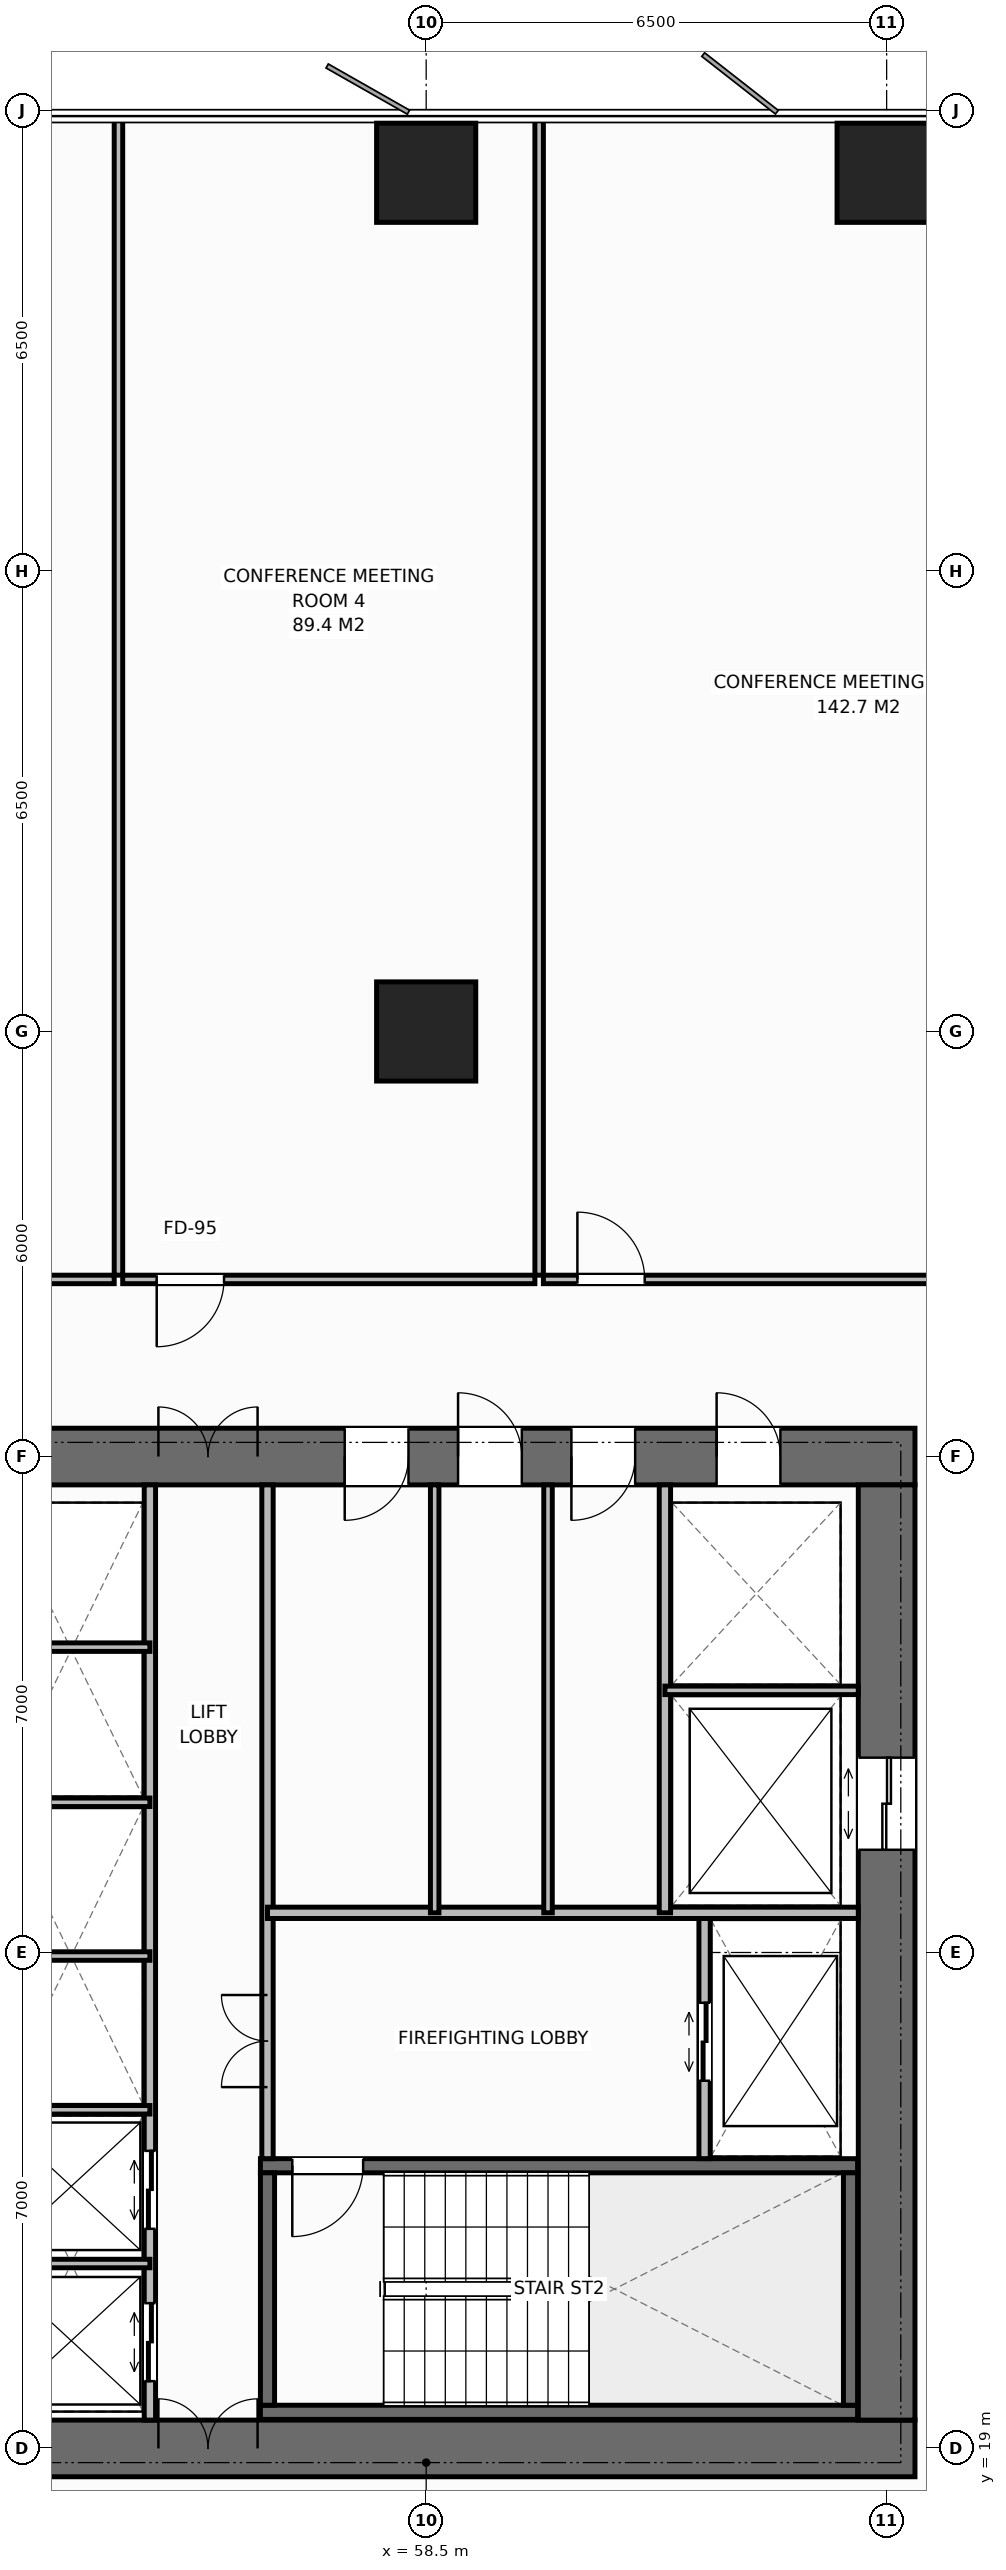
"""IFC4 building model, lengths in metres.
Left out: names, types, materials, properties, quantities, classifications, styles, units other than length and angle.
Written with IfcOpenShell. Run it as: python <this file> out.ifc"""

import sys

from ifc_helpers import new_model, si_unit, direction, frame, frame_2d, origin, origin_2d, place, context, subcontext, project, spatial, rectangle, extrude, element, fill, save


model = new_model("IFC4")
c1 = context("Model", 3, precision=1e-05, world=origin(), true_north=direction((0.0, 1.0)))
c2 = subcontext(c1, "Body", "Model", "MODEL_VIEW")
j1 = project(units=[si_unit("LENGTHUNIT", "METRE"), si_unit("PLANEANGLEUNIT", "RADIAN")], contexts=[c1])
p1 = place(None, origin())
s1 = spatial("IfcSite", under=j1, at=p1, CompositionType="ELEMENT")
p2 = place(p1, origin())
s2 = spatial("IfcBuilding", under=s1, at=p2, CompositionType="ELEMENT")
p3 = place(p2, frame((0.0, 0.0, 77.2)))
s3 = spatial("IfcBuildingStorey", under=s2, at=p3, CompositionType="ELEMENT", Elevation=77.2)
p4 = place(p3, frame((51.6, 19.0, 0.0), z_axis=(0.0, 0.0, 1.0), x_axis=(1.0, 0.0, 0.0)))
e1 = element("IfcWall", 1, at=p4, inside=s3, PredefinedType="SHEAR", context=c2, shape_type="SweptSolid", body=[
    extrude(rectangle(XDim=13.8, YDim=0.8, at=frame_2d((6.9, 0.0))), origin(), (0.0, 0.0, 1.0), 3.8),
])
p5 = place(p4, frame((3.12, 0.0, 0.0)))
e2 = element("IfcOpeningElement", 2, at=p5, cuts=e1, PredefinedType="OPENING", context=c2, shape_type="SweptSolid", body=[
    extrude(rectangle(XDim=1.4, YDim=2.2, at=frame_2d((0.7, 1.1))), frame((0.0, 0.41, 0.0), z_axis=(0.0, -1.0, 0.0), x_axis=(1.0, 0.0, 0.0)), (0.0, 0.0, 1.0), 0.82),
])
p6 = place(p3, frame((51.6, 33.0, 0.0), z_axis=(0.0, 0.0, 1.0), x_axis=(1.0, 0.0, 0.0)))
e3 = element("IfcWall", 3, at=p6, inside=s3, PredefinedType="SHEAR", context=c2, shape_type="SweptSolid", body=[
    extrude(rectangle(XDim=13.8, YDim=0.8, at=frame_2d((6.9, 0.0))), origin(), (0.0, 0.0, 1.0), 3.8),
])
p7 = place(p6, frame((3.12, 0.0, 0.0)))
e4 = element("IfcOpeningElement", 4, at=p7, cuts=e3, PredefinedType="OPENING", context=c2, shape_type="SweptSolid", body=[
    extrude(rectangle(XDim=1.4, YDim=2.2, at=frame_2d((0.7, 1.1))), frame((0.0, 0.41, 0.0), z_axis=(0.0, -1.0, 0.0), x_axis=(1.0, 0.0, 0.0)), (0.0, 0.0, 1.0), 0.82),
])
p8 = place(p6, frame((11.0, 0.0, 0.0)))
e5 = element("IfcOpeningElement", 5, at=p8, cuts=e3, PredefinedType="OPENING", context=c2, shape_type="SweptSolid", body=[
    extrude(rectangle(XDim=0.9, YDim=2.15, at=frame_2d((0.45, 1.075))), frame((0.0, 0.41, 0.0), z_axis=(0.0, -1.0, 0.0), x_axis=(1.0, 0.0, 0.0)), (0.0, 0.0, 1.0), 0.82),
])
p9 = place(p6, frame((5.75, 0.0, 0.0)))
e6 = element("IfcOpeningElement", 6, at=p9, cuts=e3, PredefinedType="OPENING", context=c2, shape_type="SweptSolid", body=[
    extrude(rectangle(XDim=0.9, YDim=2.15, at=frame_2d((0.45, 1.075))), frame((0.0, 0.41, 0.0), z_axis=(0.0, -1.0, 0.0), x_axis=(1.0, 0.0, 0.0)), (0.0, 0.0, 1.0), 0.82),
])
p10 = place(p6, frame((7.35, 0.0, 0.0)))
e7 = element("IfcOpeningElement", 7, at=p10, cuts=e3, PredefinedType="OPENING", context=c2, shape_type="SweptSolid", body=[
    extrude(rectangle(XDim=0.9, YDim=2.15, at=frame_2d((0.45, 1.075))), frame((0.0, 0.41, 0.0), z_axis=(0.0, -1.0, 0.0), x_axis=(1.0, 0.0, 0.0)), (0.0, 0.0, 1.0), 0.82),
])
p11 = place(p6, frame((8.95, 0.0, 0.0)))
e8 = element("IfcOpeningElement", 8, at=p11, cuts=e3, PredefinedType="OPENING", context=c2, shape_type="SweptSolid", body=[
    extrude(rectangle(XDim=0.9, YDim=2.15, at=frame_2d((0.45, 1.075))), frame((0.0, 0.41, 0.0), z_axis=(0.0, -1.0, 0.0), x_axis=(1.0, 0.0, 0.0)), (0.0, 0.0, 1.0), 0.82),
])
p12 = place(p3, frame((65.0, 19.4, 0.0), z_axis=(0.0, 0.0, 1.0), x_axis=(0.0, 1.0, 0.0)))
e9 = element("IfcWall", 9, at=p12, inside=s3, PredefinedType="SHEAR", context=c2, shape_type="SweptSolid", body=[
    extrude(rectangle(XDim=13.2, YDim=0.8, at=frame_2d((6.6, 0.0))), origin(), (0.0, 0.0, 1.0), 3.8),
])
p13 = place(p12, frame((8.05, 0.0, 0.0)))
e10 = element("IfcOpeningElement", 10, at=p13, cuts=e9, PredefinedType="OPENING", context=c2, shape_type="SweptSolid", body=[
    extrude(rectangle(XDim=1.3, YDim=2.2, at=frame_2d((0.65, 1.1))), frame((0.0, 0.41, 0.0), z_axis=(0.0, -1.0, 0.0), x_axis=(1.0, 0.0, 0.0)), (0.0, 0.0, 1.0), 0.82),
])
p14 = place(p3, frame((56.16, 19.51, 0.0), z_axis=(0.0, 0.0, 1.0), x_axis=(1.0, 0.0, 0.0)))
e11 = element("IfcWall", 11, at=p14, inside=s3, PredefinedType="SHEAR", context=c2, shape_type="SweptSolid", body=[
    extrude(rectangle(XDim=8.43, YDim=0.2, at=frame_2d((4.215, 0.0))), origin(), (0.0, 0.0, 1.0), 3.8),
])
p15 = place(p3, frame((56.16, 22.99, 0.0), z_axis=(0.0, 0.0, 1.0), x_axis=(1.0, 0.0, 0.0)))
e12 = element("IfcWall", 12, at=p15, inside=s3, PredefinedType="SHEAR", context=c2, shape_type="SweptSolid", body=[
    extrude(rectangle(XDim=8.43, YDim=0.2, at=frame_2d((4.215, 0.0))), origin(), (0.0, 0.0, 1.0), 3.8),
])
p16 = place(p15, frame((0.45, 0.0, 0.0)))
e13 = element("IfcOpeningElement", 13, at=p16, cuts=e12, PredefinedType="OPENING", context=c2, shape_type="SweptSolid", body=[
    extrude(rectangle(XDim=1.0, YDim=2.15, at=frame_2d((0.5, 1.075))), frame((0.0, 0.11, 0.0), z_axis=(0.0, -1.0, 0.0), x_axis=(1.0, 0.0, 0.0)), (0.0, 0.0, 1.0), 0.22),
])
for number, where, z_axis, x_axis in (
    (14, (56.26, 19.61, 0.0), (0.0, 0.0, 1.0), (0.0, 1.0, 0.0)),
    (15, (64.49, 19.61, 0.0), (0.0, 0.0, 1.0), (0.0, 1.0, 0.0)),
):
    element("IfcWall", number, at=place(p3, frame(where, z_axis=z_axis, x_axis=x_axis)), inside=s3, PredefinedType="SHEAR", context=c2, shape_type="SweptSolid", body=[
        extrude(rectangle(XDim=3.28, YDim=0.2, at=frame_2d((1.64, 0.0))), origin(), (0.0, 0.0, 1.0), 3.8),
    ])
for number, where, z_axis, x_axis in (
    (16, (58.5, 39.0, 0.0), (0.0, 0.0, 1.0), (1.0, 0.0, 0.0)),
    (17, (58.5, 51.12, 0.0), (0.0, 0.0, 1.0), (1.0, 0.0, 0.0)),
    (18, (65.0, 51.12, 0.0), (0.0, 0.0, 1.0), (1.0, 0.0, 0.0)),
):
    element("IfcColumn", number, at=place(p3, frame(where, z_axis=z_axis, x_axis=x_axis)), inside=s3, PredefinedType="COLUMN", context=c2, shape_type="SweptSolid", body=[
        extrude(rectangle(XDim=1.4, YDim=1.4, at=origin_2d()), origin(), (0.0, 0.0, 1.0), 3.8),
    ])
p17 = place(p3, frame((54.6, 19.4, 0.0), z_axis=(0.0, 0.0, 1.0), x_axis=(0.0, 1.0, 0.0)))
e19 = element("IfcWall", 19, at=p17, inside=s3, PredefinedType="STANDARD", context=c2, shape_type="SweptSolid", body=[
    extrude(rectangle(XDim=13.2, YDim=0.16, at=frame_2d((6.6, 0.0))), origin(), (0.0, 0.0, 1.0), 3.52),
])
p18 = place(p17, frame((0.55, 0.0, 0.0)))
e20 = element("IfcOpeningElement", 20, at=p18, cuts=e19, PredefinedType="OPENING", context=c2, shape_type="SweptSolid", body=[
    extrude(rectangle(XDim=1.1, YDim=2.2, at=frame_2d((0.55, 1.1))), frame((0.0, 0.09, 0.0), z_axis=(0.0, -1.0, 0.0), x_axis=(1.0, 0.0, 0.0)), (0.0, 0.0, 1.0), 0.18),
])
p19 = place(p17, frame((2.7, 0.0, 0.0)))
e21 = element("IfcOpeningElement", 21, at=p19, cuts=e19, PredefinedType="OPENING", context=c2, shape_type="SweptSolid", body=[
    extrude(rectangle(XDim=1.1, YDim=2.2, at=frame_2d((0.55, 1.1))), frame((0.0, 0.09, 0.0), z_axis=(0.0, -1.0, 0.0), x_axis=(1.0, 0.0, 0.0)), (0.0, 0.0, 1.0), 0.18),
])
p20 = place(p3, frame((56.26, 23.09, 0.0), z_axis=(0.0, 0.0, 1.0), x_axis=(0.0, 1.0, 0.0)))
e22 = element("IfcWall", 22, at=p20, inside=s3, PredefinedType="STANDARD", context=c2, shape_type="SweptSolid", body=[
    extrude(rectangle(XDim=9.51, YDim=0.16, at=frame_2d((4.755, 0.0))), origin(), (0.0, 0.0, 1.0), 3.52),
])
p21 = place(p20, frame((1.01, 0.0, 0.0)))
e23 = element("IfcOpeningElement", 23, at=p21, cuts=e22, PredefinedType="OPENING", context=c2, shape_type="SweptSolid", body=[
    extrude(rectangle(XDim=1.3, YDim=2.2, at=frame_2d((0.65, 1.1))), frame((0.0, 0.09, 0.0), z_axis=(0.0, -1.0, 0.0), x_axis=(1.0, 0.0, 0.0)), (0.0, 0.0, 1.0), 0.18),
])
for number, where, z_axis, x_axis in (
    (24, (52.4, 21.61, 0.0), (0.0, 0.0, 1.0), (1.0, 0.0, 0.0)),
    (25, (52.4, 23.78, 0.0), (0.0, 0.0, 1.0), (1.0, 0.0, 0.0)),
    (26, (52.4, 25.95, 0.0), (0.0, 0.0, 1.0), (1.0, 0.0, 0.0)),
    (27, (52.4, 28.12, 0.0), (0.0, 0.0, 1.0), (1.0, 0.0, 0.0)),
    (28, (52.4, 30.31, 0.0), (0.0, 0.0, 1.0), (1.0, 0.0, 0.0)),
):
    element("IfcWall", number, at=place(p3, frame(where, z_axis=z_axis, x_axis=x_axis)), inside=s3, PredefinedType="PARTITIONING", context=c2, shape_type="SweptSolid", body=[
        extrude(rectangle(XDim=2.2, YDim=0.12, at=frame_2d((1.1, 0.0))), origin(), (0.0, 0.0, 1.0), 3.52),
    ])
p22 = place(p3, frame((62.43, 23.09, 0.0), z_axis=(0.0, 0.0, 1.0), x_axis=(0.0, 1.0, 0.0)))
e29 = element("IfcWall", 29, at=p22, inside=s3, PredefinedType="STANDARD", context=c2, shape_type="SweptSolid", body=[
    extrude(rectangle(XDim=3.47, YDim=0.16, at=frame_2d((1.735, 0.0))), origin(), (0.0, 0.0, 1.0), 3.52),
])
p23 = place(p22, frame((1.1, 0.0, 0.0)))
e30 = element("IfcOpeningElement", 30, at=p23, cuts=e29, PredefinedType="OPENING", context=c2, shape_type="SweptSolid", body=[
    extrude(rectangle(XDim=1.1, YDim=2.2, at=frame_2d((0.55, 1.1))), frame((0.0, 0.09, 0.0), z_axis=(0.0, -1.0, 0.0), x_axis=(1.0, 0.0, 0.0)), (0.0, 0.0, 1.0), 0.18),
])
p24 = place(p3, frame((56.26, 26.56, 0.0), z_axis=(0.0, 0.0, 1.0), x_axis=(1.0, 0.0, 0.0)))
e31 = element("IfcWall", 31, at=p24, inside=s3, PredefinedType="STANDARD", context=c2, shape_type="SweptSolid", body=[
    extrude(rectangle(XDim=8.34, YDim=0.16, at=frame_2d((4.17, 0.0))), origin(), (0.0, 0.0, 1.0), 3.52),
])
p25 = place(p3, frame((61.87, 26.56, 0.0), z_axis=(0.0, 0.0, 1.0), x_axis=(0.0, 1.0, 0.0)))
e32 = element("IfcWall", 32, at=p25, inside=s3, PredefinedType="STANDARD", context=c2, shape_type="SweptSolid", body=[
    extrude(rectangle(XDim=6.04, YDim=0.16, at=frame_2d((3.02, 0.0))), origin(), (0.0, 0.0, 1.0), 3.52),
])
p26 = place(p3, frame((61.87, 29.7, 0.0), z_axis=(0.0, 0.0, 1.0), x_axis=(1.0, 0.0, 0.0)))
e33 = element("IfcWall", 33, at=p26, inside=s3, PredefinedType="PARTITIONING", context=c2, shape_type="SweptSolid", body=[
    extrude(rectangle(XDim=2.73, YDim=0.12, at=frame_2d((1.365, 0.0))), origin(), (0.0, 0.0, 1.0), 3.52),
])
for number, where, z_axis, x_axis in (
    (34, (58.62, 26.56, 0.0), (0.0, 0.0, 1.0), (0.0, 1.0, 0.0)),
    (35, (60.22, 26.56, 0.0), (0.0, 0.0, 1.0), (0.0, 1.0, 0.0)),
):
    element("IfcWall", number, at=place(p3, frame(where, z_axis=z_axis, x_axis=x_axis)), inside=s3, PredefinedType="PARTITIONING", context=c2, shape_type="SweptSolid", body=[
        extrude(rectangle(XDim=6.04, YDim=0.12, at=frame_2d((3.02, 0.0))), origin(), (0.0, 0.0, 1.0), 3.52),
    ])
p27 = place(p3, frame((54.156, 35.56, 0.0), z_axis=(0.0, 0.0, 1.0), x_axis=(0.0, 1.0, 0.0)))
e36 = element("IfcWall", 36, at=p27, inside=s3, PredefinedType="PARTITIONING", context=c2, shape_type="SweptSolid", body=[
    extrude(rectangle(XDim=16.42, YDim=0.12, at=frame_2d((8.21, 0.0))), origin(), (0.0, 0.0, 1.0), 3.52),
])
p28 = place(p3, frame((45.198, 35.5, 0.0), z_axis=(0.0, 0.0, 1.0), x_axis=(1.0, 0.0, 0.0)))
e37 = element("IfcWall", 37, at=p28, inside=s3, PredefinedType="PARTITIONING", context=c2, shape_type="SweptSolid", body=[
    extrude(rectangle(XDim=8.898, YDim=0.12, at=frame_2d((4.449, 0.0))), origin(), (0.0, 0.0, 1.0), 3.52),
])
p29 = place(p28, frame((3.974, 0.0, 0.0)))
e38 = element("IfcOpeningElement", 38, at=p29, cuts=e37, PredefinedType="OPENING", context=c2, shape_type="SweptSolid", body=[
    extrude(rectangle(XDim=0.95, YDim=2.15, at=frame_2d((0.475, 1.075))), frame((0.0, 0.07, 0.0), z_axis=(0.0, -1.0, 0.0), x_axis=(1.0, 0.0, 0.0)), (0.0, 0.0, 1.0), 0.14),
])
p30 = place(p3, frame((60.094, 35.56, 0.0), z_axis=(0.0, 0.0, 1.0), x_axis=(0.0, 1.0, 0.0)))
e39 = element("IfcWall", 39, at=p30, inside=s3, PredefinedType="PARTITIONING", context=c2, shape_type="SweptSolid", body=[
    extrude(rectangle(XDim=16.42, YDim=0.12, at=frame_2d((8.21, 0.0))), origin(), (0.0, 0.0, 1.0), 3.52),
])
p31 = place(p3, frame((54.216, 35.5, 0.0), z_axis=(0.0, 0.0, 1.0), x_axis=(1.0, 0.0, 0.0)))
e40 = element("IfcWall", 40, at=p31, inside=s3, PredefinedType="PARTITIONING", context=c2, shape_type="SweptSolid", body=[
    extrude(rectangle(XDim=5.819, YDim=0.12, at=frame_2d((2.909, 0.0))), origin(), (0.0, 0.0, 1.0), 3.52),
])
p32 = place(p31, frame((0.48, 0.0, 0.0)))
e41 = element("IfcOpeningElement", 41, at=p32, cuts=e40, PredefinedType="OPENING", context=c2, shape_type="SweptSolid", body=[
    extrude(rectangle(XDim=0.95, YDim=2.15, at=frame_2d((0.475, 1.075))), frame((0.0, 0.07, 0.0), z_axis=(0.0, -1.0, 0.0), x_axis=(1.0, 0.0, 0.0)), (0.0, 0.0, 1.0), 0.14),
])
p33 = place(p3, frame((60.155, 35.5, 0.0), z_axis=(0.0, 0.0, 1.0), x_axis=(1.0, 0.0, 0.0)))
e42 = element("IfcWall", 42, at=p33, inside=s3, PredefinedType="PARTITIONING", context=c2, shape_type="SweptSolid", body=[
    extrude(rectangle(XDim=8.898, YDim=0.12, at=frame_2d((4.449, 0.0))), origin(), (0.0, 0.0, 1.0), 3.52),
])
p34 = place(p33, frame((0.48, 0.0, 0.0)))
e43 = element("IfcOpeningElement", 43, at=p34, cuts=e42, PredefinedType="OPENING", context=c2, shape_type="SweptSolid", body=[
    extrude(rectangle(XDim=0.95, YDim=2.15, at=frame_2d((0.475, 1.075))), frame((0.0, 0.07, 0.0), z_axis=(0.0, -1.0, 0.0), x_axis=(1.0, 0.0, 0.0)), (0.0, 0.0, 1.0), 0.14),
])
p35 = place(p5, origin())
e44 = element("IfcDoor", 44, at=p35, inside=s3, OperationType="DOUBLE_DOOR_SINGLE_SWING", PredefinedType="DOOR", context=c2, shape_type="SweptSolid", body=[
    extrude(rectangle(XDim=1.4, YDim=2.2, at=frame_2d((0.7, 1.1))), frame((0.0, 0.125, 0.0), z_axis=(0.0, -1.0, 0.0), x_axis=(1.0, 0.0, 0.0)), (0.0, 0.0, 1.0), 0.05),
])
fill(e2, e44)
p36 = place(p7, origin())
e45 = element("IfcDoor", 45, at=p36, inside=s3, OperationType="DOUBLE_DOOR_SINGLE_SWING", PredefinedType="DOOR", context=c2, shape_type="SweptSolid", body=[
    extrude(rectangle(XDim=1.4, YDim=2.2, at=frame_2d((0.7, 1.1))), frame((0.0, -0.075, 0.0), z_axis=(0.0, -1.0, 0.0), x_axis=(1.0, 0.0, 0.0)), (0.0, 0.0, 1.0), 0.05),
])
fill(e4, e45)
p37 = place(p18, origin())
e46 = element("IfcDoor", 46, at=p37, inside=s3, OperationType="DOUBLE_DOOR_SLIDING", PredefinedType="DOOR", context=c2, shape_type="SweptSolid", body=[
    extrude(rectangle(XDim=1.1, YDim=2.2, at=frame_2d((0.55, 1.1))), frame((0.0, 0.025, 0.0), z_axis=(0.0, -1.0, 0.0), x_axis=(1.0, 0.0, 0.0)), (0.0, 0.0, 1.0), 0.05),
])
fill(e20, e46)
p38 = place(p19, origin())
e47 = element("IfcDoor", 47, at=p38, inside=s3, OperationType="DOUBLE_DOOR_SLIDING", PredefinedType="DOOR", context=c2, shape_type="SweptSolid", body=[
    extrude(rectangle(XDim=1.1, YDim=2.2, at=frame_2d((0.55, 1.1))), frame((0.0, 0.025, 0.0), z_axis=(0.0, -1.0, 0.0), x_axis=(1.0, 0.0, 0.0)), (0.0, 0.0, 1.0), 0.05),
])
fill(e21, e47)
p39 = place(p16, origin())
e48 = element("IfcDoor", 48, at=p39, inside=s3, OperationType="SINGLE_SWING_RIGHT", PredefinedType="DOOR", context=c2, shape_type="SweptSolid", body=[
    extrude(rectangle(XDim=1.0, YDim=2.15, at=frame_2d((0.5, 1.075))), frame((0.0, 0.025, 0.0), z_axis=(0.0, -1.0, 0.0), x_axis=(1.0, 0.0, 0.0)), (0.0, 0.0, 1.0), 0.05),
])
fill(e13, e48)
p40 = place(p23, origin())
e49 = element("IfcDoor", 49, at=p40, inside=s3, OperationType="DOUBLE_DOOR_SLIDING", PredefinedType="DOOR", context=c2, shape_type="SweptSolid", body=[
    extrude(rectangle(XDim=1.1, YDim=2.2, at=frame_2d((0.55, 1.1))), frame((0.0, 0.025, 0.0), z_axis=(0.0, -1.0, 0.0), x_axis=(1.0, 0.0, 0.0)), (0.0, 0.0, 1.0), 0.05),
])
fill(e30, e49)
p41 = place(p21, origin())
e50 = element("IfcDoor", 50, at=p41, inside=s3, OperationType="DOUBLE_DOOR_SINGLE_SWING", PredefinedType="DOOR", context=c2, shape_type="SweptSolid", body=[
    extrude(rectangle(XDim=1.3, YDim=2.2, at=frame_2d((0.65, 1.1))), frame((0.0, 0.025, 0.0), z_axis=(0.0, -1.0, 0.0), x_axis=(1.0, 0.0, 0.0)), (0.0, 0.0, 1.0), 0.05),
])
fill(e23, e50)
p42 = place(p13, origin())
e51 = element("IfcDoor", 51, at=p42, inside=s3, OperationType="DOUBLE_DOOR_SLIDING", PredefinedType="DOOR", context=c2, shape_type="SweptSolid", body=[
    extrude(rectangle(XDim=1.3, YDim=2.2, at=frame_2d((0.65, 1.1))), frame((0.0, 0.025, 0.0), z_axis=(0.0, -1.0, 0.0), x_axis=(1.0, 0.0, 0.0)), (0.0, 0.0, 1.0), 0.05),
])
fill(e10, e51)
p43 = place(p8, origin())
e52 = element("IfcDoor", 52, at=p43, inside=s3, OperationType="SINGLE_SWING_LEFT", PredefinedType="DOOR", context=c2, shape_type="SweptSolid", body=[
    extrude(rectangle(XDim=0.9, YDim=2.15, at=frame_2d((0.45, 1.075))), frame((0.0, -0.075, 0.0), z_axis=(0.0, -1.0, 0.0), x_axis=(1.0, 0.0, 0.0)), (0.0, 0.0, 1.0), 0.05),
])
fill(e5, e52)
p44 = place(p9, origin())
e53 = element("IfcDoor", 53, at=p44, inside=s3, OperationType="SINGLE_SWING_RIGHT", PredefinedType="DOOR", context=c2, shape_type="SweptSolid", body=[
    extrude(rectangle(XDim=0.9, YDim=2.15, at=frame_2d((0.45, 1.075))), frame((0.0, -0.075, 0.0), z_axis=(0.0, -1.0, 0.0), x_axis=(1.0, 0.0, 0.0)), (0.0, 0.0, 1.0), 0.05),
])
fill(e6, e53)
p45 = place(p10, origin())
e54 = element("IfcDoor", 54, at=p45, inside=s3, OperationType="SINGLE_SWING_LEFT", PredefinedType="DOOR", context=c2, shape_type="SweptSolid", body=[
    extrude(rectangle(XDim=0.9, YDim=2.15, at=frame_2d((0.45, 1.075))), frame((0.0, -0.075, 0.0), z_axis=(0.0, -1.0, 0.0), x_axis=(1.0, 0.0, 0.0)), (0.0, 0.0, 1.0), 0.05),
])
fill(e7, e54)
p46 = place(p11, origin())
e55 = element("IfcDoor", 55, at=p46, inside=s3, OperationType="SINGLE_SWING_RIGHT", PredefinedType="DOOR", context=c2, shape_type="SweptSolid", body=[
    extrude(rectangle(XDim=0.9, YDim=2.15, at=frame_2d((0.45, 1.075))), frame((0.0, -0.075, 0.0), z_axis=(0.0, -1.0, 0.0), x_axis=(1.0, 0.0, 0.0)), (0.0, 0.0, 1.0), 0.05),
])
fill(e8, e55)
p47 = place(p32, origin())
e56 = element("IfcDoor", 56, at=p47, inside=s3, OperationType="SINGLE_SWING_RIGHT", PredefinedType="DOOR", context=c2, shape_type="SweptSolid", body=[
    extrude(rectangle(XDim=0.95, YDim=2.15, at=frame_2d((0.475, 1.075))), frame((0.0, 0.025, 0.0), z_axis=(0.0, -1.0, 0.0), x_axis=(1.0, 0.0, 0.0)), (0.0, 0.0, 1.0), 0.05),
])
fill(e41, e56)
p48 = place(p34, origin())
e57 = element("IfcDoor", 57, at=p48, inside=s3, OperationType="SINGLE_SWING_LEFT", PredefinedType="DOOR", context=c2, shape_type="SweptSolid", body=[
    extrude(rectangle(XDim=0.95, YDim=2.15, at=frame_2d((0.475, 1.075))), frame((0.0, 0.025, 0.0), z_axis=(0.0, -1.0, 0.0), x_axis=(1.0, 0.0, 0.0)), (0.0, 0.0, 1.0), 0.05),
])
fill(e43, e57)
save(model, sys.argv[1])
